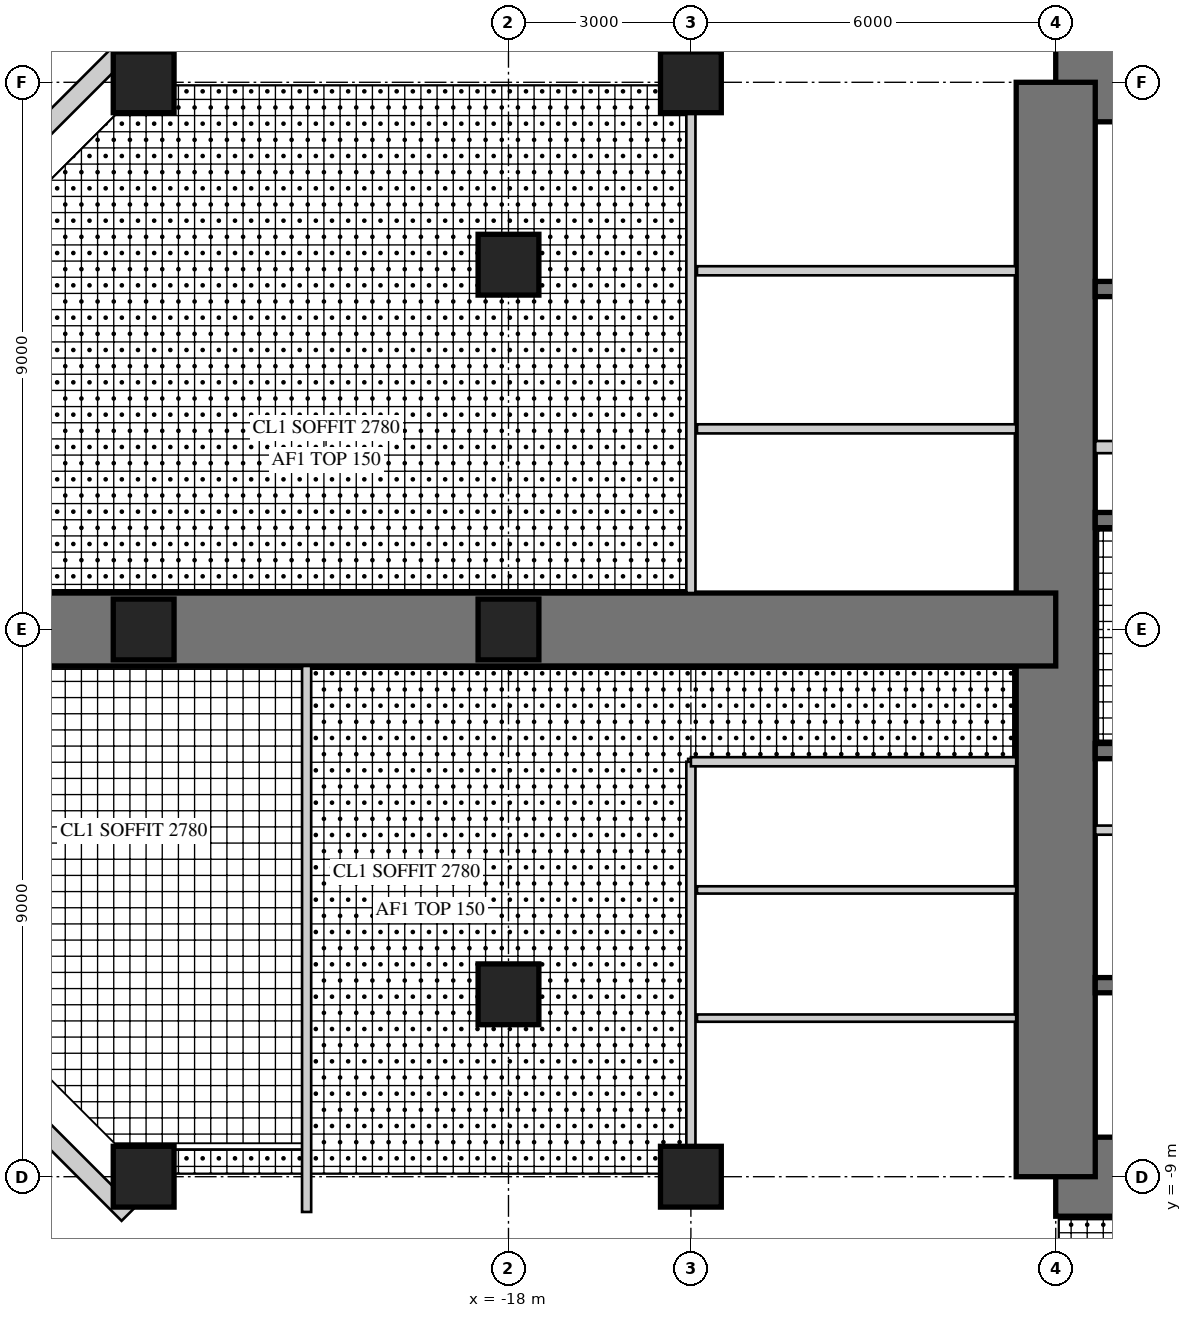
"""IFC4 building model, lengths in metres.
Left out: names, types, materials, properties, quantities, classifications, styles, units other than length and angle.
Written with IfcOpenShell. Run it as: python <this file> out.ifc"""

import sys

from ifc_helpers import new_model, si_unit, direction, frame, frame_2d, origin, origin_2d, place, context, subcontext, project, spatial, rectangle, extrude, element, fill, save


model = new_model("IFC4")
c1 = context("Model", 3, precision=1e-05, world=origin(), true_north=direction((0.0, 1.0)))
c2 = subcontext(c1, "Body", "Model", "MODEL_VIEW")
j1 = project(units=[si_unit("LENGTHUNIT", "METRE"), si_unit("PLANEANGLEUNIT", "RADIAN")], contexts=[c1])
p1 = place(None, origin())
s1 = spatial("IfcSite", under=j1, at=p1, CompositionType="ELEMENT")
p2 = place(p1, origin())
s2 = spatial("IfcBuilding", under=s1, at=p2, CompositionType="ELEMENT")
p3 = place(p2, frame((0.0, 0.0, 104.5)))
s3 = spatial("IfcBuildingStorey", under=s2, at=p3, CompositionType="ELEMENT", Elevation=104.5)
p4 = place(p3, frame((9.0, 9.0, 0.0), z_axis=(0.0, 0.0, 1.0), x_axis=(-1.0, 0.0, 0.0)))
e1 = element("IfcWall", 1, at=p4, inside=s3, PredefinedType="SHEAR", context=c2, shape_type="SweptSolid", body=[
    extrude(rectangle(XDim=18.0, YDim=1.3, at=frame_2d((9.0, 0.0))), origin(), (0.0, 0.0, 1.0), 4.0),
])
p5 = place(p4, frame((9.8, 0.0, 0.0)))
e2 = element("IfcOpeningElement", 2, at=p5, cuts=e1, PredefinedType="OPENING", context=c2, shape_type="SweptSolid", body=[
    extrude(rectangle(XDim=1.0, YDim=2.4, at=frame_2d((0.5, 1.2))), frame((0.0, 0.66, 0.0), z_axis=(0.0, -1.0, 0.0), x_axis=(1.0, 0.0, 0.0)), (0.0, 0.0, 1.0), 1.32),
])
p6 = place(p3, frame((-9.0, -9.0, 0.0), z_axis=(0.0, 0.0, 1.0), x_axis=(1.0, 0.0, 0.0)))
e3 = element("IfcWall", 3, at=p6, inside=s3, PredefinedType="SHEAR", context=c2, shape_type="SweptSolid", body=[
    extrude(rectangle(XDim=18.0, YDim=1.3, at=frame_2d((9.0, 0.0))), origin(), (0.0, 0.0, 1.0), 4.0),
])
p7 = place(p6, frame((9.8, 0.0, 0.0)))
e4 = element("IfcOpeningElement", 4, at=p7, cuts=e3, PredefinedType="OPENING", context=c2, shape_type="SweptSolid", body=[
    extrude(rectangle(XDim=1.0, YDim=2.4, at=frame_2d((0.5, 1.2))), frame((0.0, 0.66, 0.0), z_axis=(0.0, -1.0, 0.0), x_axis=(1.0, 0.0, 0.0)), (0.0, 0.0, 1.0), 1.32),
])
p8 = place(p3, frame((-9.0, 9.0, 0.0), z_axis=(0.0, 0.0, 1.0), x_axis=(0.0, -1.0, 0.0)))
e5 = element("IfcWall", 5, at=p8, inside=s3, PredefinedType="SHEAR", context=c2, shape_type="SweptSolid", body=[
    extrude(rectangle(XDim=18.0, YDim=1.3, at=frame_2d((9.0, 0.0))), origin(), (0.0, 0.0, 1.0), 4.0),
])
p9 = place(p8, frame((9.8, 0.0, 0.0)))
e6 = element("IfcOpeningElement", 6, at=p9, cuts=e5, PredefinedType="OPENING", context=c2, shape_type="SweptSolid", body=[
    extrude(rectangle(XDim=1.0, YDim=2.4, at=frame_2d((0.5, 1.2))), frame((0.0, 0.66, 0.0), z_axis=(0.0, -1.0, 0.0), x_axis=(1.0, 0.0, 0.0)), (0.0, 0.0, 1.0), 1.32),
])
p10 = place(p3, frame((-2.125, 1.8, 0.0), z_axis=(0.0, 0.0, 1.0), x_axis=(-1.0, 0.0, 0.0)))
e7 = element("IfcWall", 7, at=p10, inside=s3, PredefinedType="SHEAR", context=c2, shape_type="SweptSolid", body=[
    extrude(rectangle(XDim=6.225, YDim=0.25, at=frame_2d((3.113, 0.0))), origin(), (0.0, 0.0, 1.0), 4.0),
])
p11 = place(p3, frame((-2.125, 5.6, 0.0), z_axis=(0.0, 0.0, 1.0), x_axis=(-1.0, 0.0, 0.0)))
e8 = element("IfcWall", 8, at=p11, inside=s3, PredefinedType="SHEAR", context=c2, shape_type="SweptSolid", body=[
    extrude(rectangle(XDim=6.225, YDim=0.25, at=frame_2d((3.113, 0.0))), origin(), (0.0, 0.0, 1.0), 4.0),
])
p12 = place(p11, frame((0.175, 0.0, 0.0)))
e9 = element("IfcOpeningElement", 9, at=p12, cuts=e8, PredefinedType="OPENING", context=c2, shape_type="SweptSolid", body=[
    extrude(rectangle(XDim=1.0, YDim=2.1, at=frame_2d((0.5, 1.05))), frame((0.0, 0.135, 0.0), z_axis=(0.0, -1.0, 0.0), x_axis=(1.0, 0.0, 0.0)), (0.0, 0.0, 1.0), 0.27),
])
p13 = place(p3, frame((-5.725, 3.0, 0.0), z_axis=(0.0, 0.0, 1.0), x_axis=(-1.0, 0.0, 0.0)))
e10 = element("IfcWall", 10, at=p13, inside=s3, PredefinedType="PARTITIONING", context=c2, shape_type="SweptSolid", body=[
    extrude(rectangle(XDim=2.625, YDim=0.2, at=frame_2d((1.312, 0.0))), origin(), (0.0, 0.0, 1.0), 4.0),
])
for number, where, z_axis, x_axis in (
    (11, (-1.925, -2.0, 0.0), (0.0, 0.0, 1.0), (-1.0, 0.0, 0.0)),
    (12, (-1.925, -5.85, 0.0), (0.0, 0.0, 1.0), (-1.0, 0.0, 0.0)),
):
    element("IfcWall", number, at=place(p3, frame(where, z_axis=z_axis, x_axis=x_axis)), inside=s3, PredefinedType="SHEAR", context=c2, shape_type="SweptSolid", body=[
        extrude(rectangle(XDim=6.425, YDim=0.25, at=frame_2d((3.212, 0.0))), origin(), (0.0, 0.0, 1.0), 4.0),
    ])
p14 = place(p3, frame((-1.925, -3.3, 0.0), z_axis=(0.0, 0.0, 1.0), x_axis=(-1.0, 0.0, 0.0)))
e13 = element("IfcWall", 13, at=p14, inside=s3, PredefinedType="PARTITIONING", context=c2, shape_type="SweptSolid", body=[
    extrude(rectangle(XDim=6.425, YDim=0.15, at=frame_2d((3.212, 0.0))), origin(), (0.0, 0.0, 1.0), 4.0),
])
p15 = place(p14, frame((0.075, 0.0, 0.0)))
e14 = element("IfcOpeningElement", 14, at=p15, cuts=e13, PredefinedType="OPENING", context=c2, shape_type="SweptSolid", body=[
    extrude(rectangle(XDim=0.8, YDim=2.1, at=frame_2d((0.4, 1.05))), frame((0.0, 0.085, 0.0), z_axis=(0.0, -1.0, 0.0), x_axis=(1.0, 0.0, 0.0)), (0.0, 0.0, 1.0), 0.17),
])
p16 = place(p14, frame((3.675, 0.0, 0.0)))
e15 = element("IfcOpeningElement", 15, at=p16, cuts=e13, PredefinedType="OPENING", context=c2, shape_type="SweptSolid", body=[
    extrude(rectangle(XDim=0.8, YDim=2.1, at=frame_2d((0.4, 1.05))), frame((0.0, 0.085, 0.0), z_axis=(0.0, -1.0, 0.0), x_axis=(1.0, 0.0, 0.0)), (0.0, 0.0, 1.0), 0.17),
])
p17 = place(p3, frame((-9.0, 0.0, 0.0), z_axis=(0.0, 0.0, 1.0), x_axis=(-1.0, 0.0, 0.0)))
e16 = element("IfcWall", 16, at=p17, inside=s3, PredefinedType="SHEAR", context=c2, shape_type="SweptSolid", body=[
    extrude(rectangle(XDim=18.0, YDim=1.2, at=frame_2d((9.0, 0.0))), origin(), (0.0, 0.0, 1.0), 4.0),
])
p18 = place(p17, frame((9.8, 0.0, 0.0)))
e17 = element("IfcOpeningElement", 17, at=p18, cuts=e16, PredefinedType="OPENING", context=c2, shape_type="SweptSolid", body=[
    extrude(rectangle(XDim=1.0, YDim=2.2, at=frame_2d((0.5, 1.1))), frame((0.0, 0.61, 0.0), z_axis=(0.0, -1.0, 0.0), x_axis=(1.0, 0.0, 0.0)), (0.0, 0.0, 1.0), 1.22),
])
for number, where, z_axis, x_axis in (
    (18, (-15.0, 9.0, 0.0), (0.0, 0.0, 1.0), (1.0, 0.0, 0.0)),
    (19, (-24.0, 9.0, 0.0), (0.0, 0.0, 1.0), (1.0, 0.0, 0.0)),
    (20, (-15.0, -9.0, 0.0), (0.0, 0.0, 1.0), (1.0, 0.0, 0.0)),
    (21, (-24.0, -9.0, 0.0), (0.0, 0.0, 1.0), (1.0, 0.0, 0.0)),
    (22, (-18.0, 6.0, 0.0), (0.0, 0.0, 1.0), (1.0, 0.0, 0.0)),
    (23, (-18.0, 0.0, 0.0), (0.0, 0.0, 1.0), (1.0, 0.0, 0.0)),
    (24, (-18.0, -6.0, 0.0), (0.0, 0.0, 1.0), (1.0, 0.0, 0.0)),
    (25, (-24.0, 0.0, 0.0), (0.0, 0.0, 1.0), (1.0, 0.0, 0.0)),
):
    element("IfcColumn", number, at=place(p3, frame(where, z_axis=z_axis, x_axis=x_axis)), inside=s3, PredefinedType="COLUMN", context=c2, shape_type="SweptSolid", body=[
        extrude(rectangle(XDim=1.0, YDim=1.0, at=origin_2d()), origin(), (0.0, 0.0, 1.0), 4.0),
    ])
p19 = place(p3, frame((-24.257, 9.62, 0.0), z_axis=(0.0, 0.0, 1.0), x_axis=(-0.707106781187, -0.707106781187, 0.0)))
e26 = element("IfcWall", 26, at=p19, inside=s3, PredefinedType="SOLIDWALL", context=c2, shape_type="SweptSolid", body=[
    extrude(rectangle(XDim=4.728, YDim=0.3, at=frame_2d((2.364, 0.0))), origin(), (0.0, 0.0, 1.0), 3.8),
])
p20 = place(p19, frame((1.914, 0.0, 0.3)))
e27 = element("IfcOpeningElement", 27, at=p20, cuts=e26, PredefinedType="OPENING", context=c2, shape_type="SweptSolid", body=[
    extrude(rectangle(XDim=0.9, YDim=2.4, at=frame_2d((0.45, 1.2))), frame((0.0, 0.16, 0.0), z_axis=(0.0, -1.0, 0.0), x_axis=(1.0, 0.0, 0.0)), (0.0, 0.0, 1.0), 0.32),
])
p21 = place(p3, frame((-27.6, -6.277, 0.0), z_axis=(0.0, 0.0, 1.0), x_axis=(0.707106781187, -0.707106781187, 0.0)))
e28 = element("IfcWall", 28, at=p21, inside=s3, PredefinedType="SOLIDWALL", context=c2, shape_type="SweptSolid", body=[
    extrude(rectangle(XDim=4.728, YDim=0.3, at=frame_2d((2.364, 0.0))), origin(), (0.0, 0.0, 1.0), 3.8),
])
p22 = place(p21, frame((1.914, 0.0, 0.3)))
e29 = element("IfcOpeningElement", 29, at=p22, cuts=e28, PredefinedType="OPENING", context=c2, shape_type="SweptSolid", body=[
    extrude(rectangle(XDim=0.9, YDim=2.4, at=frame_2d((0.45, 1.2))), frame((0.0, 0.16, 0.0), z_axis=(0.0, -1.0, 0.0), x_axis=(1.0, 0.0, 0.0)), (0.0, 0.0, 1.0), 0.32),
])
p23 = place(p3, frame((-15.0, -2.175, 0.0), z_axis=(0.0, 0.0, 1.0), x_axis=(0.0, -1.0, 0.0)))
e30 = element("IfcWall", 30, at=p23, inside=s3, PredefinedType="PARTITIONING", context=c2, shape_type="SweptSolid", body=[
    extrude(rectangle(XDim=6.325, YDim=0.15, at=frame_2d((3.163, 0.0))), origin(), (0.0, 0.0, 1.0), 3.0),
])
p24 = place(p23, frame((0.554, 0.0, 0.0)))
e31 = element("IfcOpeningElement", 31, at=p24, cuts=e30, PredefinedType="OPENING", context=c2, shape_type="SweptSolid", body=[
    extrude(rectangle(XDim=1.0, YDim=2.1, at=frame_2d((0.5, 1.05))), frame((0.0, 0.085, 0.0), z_axis=(0.0, -1.0, 0.0), x_axis=(1.0, 0.0, 0.0)), (0.0, 0.0, 1.0), 0.17),
])
p25 = place(p23, frame((2.663, 0.0, 0.0)))
e32 = element("IfcOpeningElement", 32, at=p25, cuts=e30, PredefinedType="OPENING", context=c2, shape_type="SweptSolid", body=[
    extrude(rectangle(XDim=1.0, YDim=2.1, at=frame_2d((0.5, 1.05))), frame((0.0, 0.085, 0.0), z_axis=(0.0, -1.0, 0.0), x_axis=(1.0, 0.0, 0.0)), (0.0, 0.0, 1.0), 0.17),
])
p26 = place(p23, frame((4.771, 0.0, 0.0)))
e33 = element("IfcOpeningElement", 33, at=p26, cuts=e30, PredefinedType="OPENING", context=c2, shape_type="SweptSolid", body=[
    extrude(rectangle(XDim=1.0, YDim=2.1, at=frame_2d((0.5, 1.05))), frame((0.0, 0.085, 0.0), z_axis=(0.0, -1.0, 0.0), x_axis=(1.0, 0.0, 0.0)), (0.0, 0.0, 1.0), 0.17),
])
p27 = place(p3, frame((-9.65, -2.175, 0.0), z_axis=(0.0, 0.0, 1.0), x_axis=(-1.0, 0.0, 0.0)))
e34 = element("IfcWall", 34, at=p27, inside=s3, PredefinedType="PARTITIONING", context=c2, shape_type="SweptSolid", body=[
    extrude(rectangle(XDim=5.35, YDim=0.15, at=frame_2d((2.675, 0.0))), origin(), (0.0, 0.0, 1.0), 3.8),
])
for number, where, z_axis, x_axis in (
    (35, (-9.65, -4.283, 0.0), (0.0, 0.0, 1.0), (-1.0, 0.0, 0.0)),
    (36, (-9.65, -6.392, 0.0), (0.0, 0.0, 1.0), (-1.0, 0.0, 0.0)),
):
    element("IfcWall", number, at=place(p3, frame(where, z_axis=z_axis, x_axis=x_axis)), inside=s3, PredefinedType="PLUMBINGWALL", context=c2, shape_type="SweptSolid", body=[
        extrude(rectangle(XDim=5.25, YDim=0.12, at=frame_2d((2.625, 0.0))), origin(), (0.0, 0.0, 1.0), 3.8),
    ])
p28 = place(p3, frame((-15.0, 8.5, 0.0), z_axis=(0.0, 0.0, 1.0), x_axis=(0.0, -1.0, 0.0)))
e37 = element("IfcWall", 37, at=p28, inside=s3, PredefinedType="PARTITIONING", context=c2, shape_type="SweptSolid", body=[
    extrude(rectangle(XDim=7.9, YDim=0.15, at=frame_2d((3.95, 0.0))), origin(), (0.0, 0.0, 1.0), 3.0),
])
p29 = place(p28, frame((0.8, 0.0, 0.0)))
e38 = element("IfcOpeningElement", 38, at=p29, cuts=e37, PredefinedType="OPENING", context=c2, shape_type="SweptSolid", body=[
    extrude(rectangle(XDim=1.0, YDim=2.1, at=frame_2d((0.5, 1.05))), frame((0.0, 0.085, 0.0), z_axis=(0.0, -1.0, 0.0), x_axis=(1.0, 0.0, 0.0)), (0.0, 0.0, 1.0), 0.17),
])
p30 = place(p28, frame((3.4, 0.0, 0.0)))
e39 = element("IfcOpeningElement", 39, at=p30, cuts=e37, PredefinedType="OPENING", context=c2, shape_type="SweptSolid", body=[
    extrude(rectangle(XDim=1.0, YDim=2.1, at=frame_2d((0.5, 1.05))), frame((0.0, 0.085, 0.0), z_axis=(0.0, -1.0, 0.0), x_axis=(1.0, 0.0, 0.0)), (0.0, 0.0, 1.0), 0.17),
])
p31 = place(p28, frame((6.05, 0.0, 0.0)))
e40 = element("IfcOpeningElement", 40, at=p31, cuts=e37, PredefinedType="OPENING", context=c2, shape_type="SweptSolid", body=[
    extrude(rectangle(XDim=1.0, YDim=2.1, at=frame_2d((0.5, 1.05))), frame((0.0, 0.085, 0.0), z_axis=(0.0, -1.0, 0.0), x_axis=(1.0, 0.0, 0.0)), (0.0, 0.0, 1.0), 0.17),
])
p32 = place(p3, frame((-9.65, 3.3, 0.0), z_axis=(0.0, 0.0, 1.0), x_axis=(-1.0, 0.0, 0.0)))
e41 = element("IfcWall", 41, at=p32, inside=s3, PredefinedType="PARTITIONING", context=c2, shape_type="SweptSolid", body=[
    extrude(rectangle(XDim=5.25, YDim=0.15, at=frame_2d((2.625, 0.0))), origin(), (0.0, 0.0, 1.0), 3.8),
])
p33 = place(p3, frame((-9.65, 5.9, 0.0), z_axis=(0.0, 0.0, 1.0), x_axis=(-1.0, 0.0, 0.0)))
e42 = element("IfcWall", 42, at=p33, inside=s3, PredefinedType="PARTITIONING", context=c2, shape_type="SweptSolid", body=[
    extrude(rectangle(XDim=5.25, YDim=0.15, at=frame_2d((2.625, 0.0))), origin(), (0.0, 0.0, 1.0), 3.1),
])
p34 = place(p3, frame((-21.32, -0.6, 0.0), z_axis=(0.0, 0.0, 1.0), x_axis=(0.0, -1.0, 0.0)))
e43 = element("IfcWall", 43, at=p34, inside=s3, PredefinedType="PARTITIONING", context=c2, shape_type="SweptSolid", body=[
    extrude(rectangle(XDim=8.98, YDim=0.15, at=frame_2d((4.49, 0.0))), origin(), (0.0, 0.0, 1.0), 3.8),
])
p35 = place(p34, frame((0.45, 0.0, 0.0)))
e44 = element("IfcOpeningElement", 44, at=p35, cuts=e43, PredefinedType="OPENING", context=c2, shape_type="SweptSolid", body=[
    extrude(rectangle(XDim=1.0, YDim=2.2, at=frame_2d((0.5, 1.1))), frame((0.0, 0.085, 0.0), z_axis=(0.0, -1.0, 0.0), x_axis=(1.0, 0.0, 0.0)), (0.0, 0.0, 1.0), 0.17),
])
p36 = place(p24, origin())
e45 = element("IfcDoor", 45, at=p36, inside=s3, OperationType="SINGLE_SWING_LEFT", PredefinedType="DOOR", context=c2, shape_type="SweptSolid", body=[
    extrude(rectangle(XDim=1.0, YDim=2.1, at=frame_2d((0.5, 1.05))), frame((0.0, 0.025, 0.0), z_axis=(0.0, -1.0, 0.0), x_axis=(1.0, 0.0, 0.0)), (0.0, 0.0, 1.0), 0.05),
])
fill(e31, e45)
p37 = place(p25, origin())
e46 = element("IfcDoor", 46, at=p37, inside=s3, OperationType="SINGLE_SWING_LEFT", PredefinedType="DOOR", context=c2, shape_type="SweptSolid", body=[
    extrude(rectangle(XDim=1.0, YDim=2.1, at=frame_2d((0.5, 1.05))), frame((0.0, 0.025, 0.0), z_axis=(0.0, -1.0, 0.0), x_axis=(1.0, 0.0, 0.0)), (0.0, 0.0, 1.0), 0.05),
])
fill(e32, e46)
p38 = place(p26, origin())
e47 = element("IfcDoor", 47, at=p38, inside=s3, OperationType="SINGLE_SWING_LEFT", PredefinedType="DOOR", context=c2, shape_type="SweptSolid", body=[
    extrude(rectangle(XDim=1.0, YDim=2.1, at=frame_2d((0.5, 1.05))), frame((0.0, 0.025, 0.0), z_axis=(0.0, -1.0, 0.0), x_axis=(1.0, 0.0, 0.0)), (0.0, 0.0, 1.0), 0.05),
])
fill(e33, e47)
p39 = place(p29, origin())
e48 = element("IfcDoor", 48, at=p39, inside=s3, OperationType="SINGLE_SWING_RIGHT", PredefinedType="DOOR", context=c2, shape_type="SweptSolid", body=[
    extrude(rectangle(XDim=1.0, YDim=2.1, at=frame_2d((0.5, 1.05))), frame((0.0, 0.025, 0.0), z_axis=(0.0, -1.0, 0.0), x_axis=(1.0, 0.0, 0.0)), (0.0, 0.0, 1.0), 0.05),
])
fill(e38, e48)
p40 = place(p30, origin())
e49 = element("IfcDoor", 49, at=p40, inside=s3, OperationType="SINGLE_SWING_LEFT", PredefinedType="DOOR", context=c2, shape_type="SweptSolid", body=[
    extrude(rectangle(XDim=1.0, YDim=2.1, at=frame_2d((0.5, 1.05))), frame((0.0, 0.025, 0.0), z_axis=(0.0, -1.0, 0.0), x_axis=(1.0, 0.0, 0.0)), (0.0, 0.0, 1.0), 0.05),
])
fill(e39, e49)
p41 = place(p31, origin())
e50 = element("IfcDoor", 50, at=p41, inside=s3, OperationType="SINGLE_SWING_LEFT", PredefinedType="DOOR", context=c2, shape_type="SweptSolid", body=[
    extrude(rectangle(XDim=1.0, YDim=2.1, at=frame_2d((0.5, 1.05))), frame((0.0, 0.025, 0.0), z_axis=(0.0, -1.0, 0.0), x_axis=(1.0, 0.0, 0.0)), (0.0, 0.0, 1.0), 0.05),
])
fill(e40, e50)
p42 = place(p35, frame((1.0, 0.0, 0.0), z_axis=(0.0, 0.0, 1.0), x_axis=(-1.0, 0.0, 0.0)))
e51 = element("IfcDoor", 51, at=p42, inside=s3, OperationType="SINGLE_SWING_RIGHT", PredefinedType="DOOR", context=c2, shape_type="SweptSolid", body=[
    extrude(rectangle(XDim=1.0, YDim=2.2, at=frame_2d((0.5, 1.1))), frame((0.0, 0.025, 0.0), z_axis=(0.0, -1.0, 0.0), x_axis=(1.0, 0.0, 0.0)), (0.0, 0.0, 1.0), 0.05),
])
fill(e44, e51)
p43 = place(p18, origin())
e52 = element("IfcDoor", 52, at=p43, inside=s3, OperationType="SINGLE_SWING_RIGHT", PredefinedType="DOOR", context=c2, shape_type="SweptSolid", body=[
    extrude(rectangle(XDim=1.0, YDim=2.2, at=frame_2d((0.5, 1.1))), frame((0.0, 0.025, 0.0), z_axis=(0.0, -1.0, 0.0), x_axis=(1.0, 0.0, 0.0)), (0.0, 0.0, 1.0), 0.05),
])
fill(e17, e52)
p44 = place(p9, frame((1.0, 0.0, 0.0), z_axis=(0.0, 0.0, 1.0), x_axis=(-1.0, 0.0, 0.0)))
e53 = element("IfcDoor", 53, at=p44, inside=s3, OperationType="SINGLE_SWING_RIGHT", PredefinedType="DOOR", context=c2, shape_type="SweptSolid", body=[
    extrude(rectangle(XDim=1.0, YDim=2.4, at=frame_2d((0.5, 1.2))), frame((0.0, -0.005, 0.0), z_axis=(0.0, -1.0, 0.0), x_axis=(1.0, 0.0, 0.0)), (0.0, 0.0, 1.0), 0.05),
])
fill(e6, e53)
save(model, sys.argv[1])
